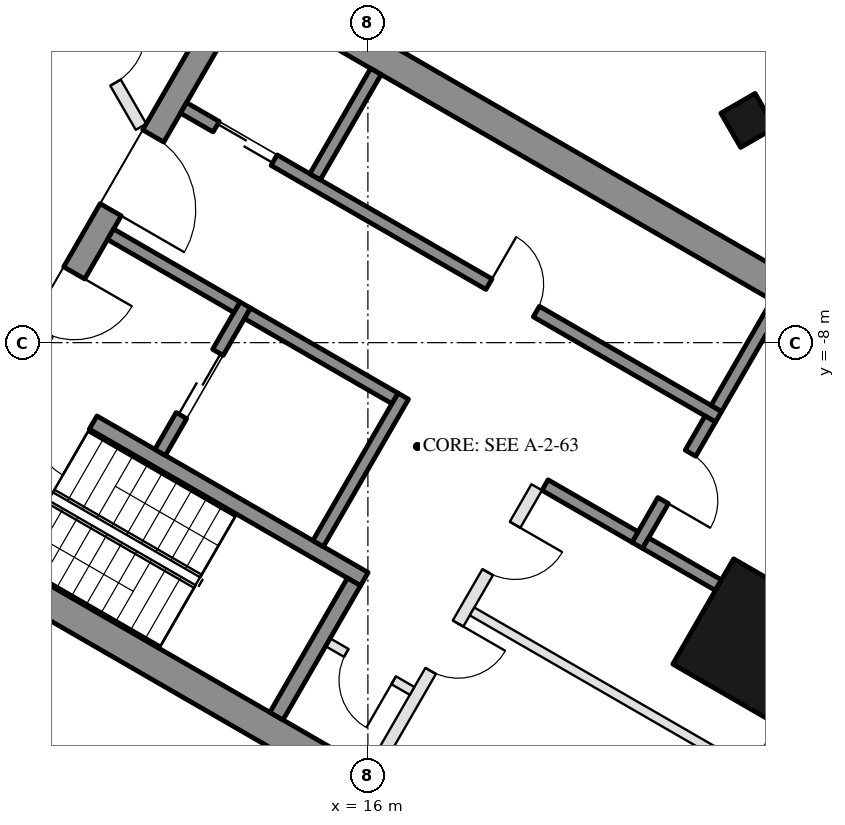
"""IFC4 building model, lengths in metres.
Left out: names, types, materials, properties, quantities, classifications, styles, units other than length and angle.
Written with IfcOpenShell. Run it as: python <this file> out.ifc"""

import sys

from ifc_helpers import new_model, si_unit, direction, frame, frame_2d, origin, origin_2d, place, context, subcontext, project, spatial, rectangle, hollow_rectangle, extrude, boolean, halfspace, element, fill, save


model = new_model("IFC4")
c1 = context("Model", 3, precision=1e-05, world=origin(), true_north=direction((0.0, 1.0)))
c2 = subcontext(c1, "Body", "Model", "MODEL_VIEW")
j1 = project(units=[si_unit("LENGTHUNIT", "METRE"), si_unit("PLANEANGLEUNIT", "RADIAN")], contexts=[c1])
p1 = place(None, origin())
s1 = spatial("IfcSite", under=j1, at=p1, CompositionType="ELEMENT")
p2 = place(p1, origin())
s2 = spatial("IfcBuilding", under=s1, at=p2, CompositionType="ELEMENT")
p3 = place(p2, frame((0.0, 0.0, 272.6)))
s3 = spatial("IfcBuildingStorey", under=s2, at=p3, CompositionType="ELEMENT", Elevation=272.6)
p4 = place(p3, frame((22.249, -4.345, 0.0), z_axis=(0.0, 0.0, 1.0), x_axis=(-0.5, 0.866025403784, 0.0)))
e1 = element("IfcColumn", 1, at=p4, inside=s3, PredefinedType="COLUMN", context=c2, shape_type="SweptSolid", body=[
    boolean("DIFFERENCE", extrude(hollow_rectangle(XDim=0.65, YDim=0.65, WallThickness=0.03, at=origin_2d()), origin(), (0.0, 0.0, 1.0), 3.7), halfspace(frame((0.0, 0.0, 3.653), z_axis=(0.0, 0.0, 1.0), x_axis=(1.0, 0.0, 0.0)), False)),
])
p5 = place(p3, frame((22.38, -12.921, 0.0), z_axis=(0.0, 0.0, 1.0), x_axis=(0.5, 0.866025403784, 0.0)))
e2 = element("IfcColumn", 2, at=p5, inside=s3, PredefinedType="COLUMN", context=c2, shape_type="SweptSolid", body=[
    boolean("DIFFERENCE", extrude(hollow_rectangle(XDim=2.0, YDim=2.0, WallThickness=0.05, at=origin_2d()), origin(), (0.0, 0.0, 1.0), 3.7), halfspace(frame((0.0, 0.0, 3.587), z_axis=(0.0, 0.0, 1.0), x_axis=(1.0, 0.0, 0.0)), False)),
])
p6 = place(p3, frame((22.065, -15.817, 0.0), z_axis=(0.0, 0.0, 1.0), x_axis=(0.500025039717, 0.866010946615, 0.0)))
e3 = element("IfcWall", 3, at=p6, inside=s3, PredefinedType="SOLIDWALL", context=c2, shape_type="SweptSolid", body=[
    extrude(rectangle(XDim=5.331, YDim=0.35, at=frame_2d((2.666, 0.0))), origin(), (0.0, 0.0, 1.0), 3.55),
])
p7 = place(p3, frame((24.731, -6.193, 0.0), z_axis=(0.0, 0.0, 1.0), x_axis=(-0.500007749075, 0.866020929808, 0.0)))
e4 = element("IfcWall", 4, at=p7, inside=s3, PredefinedType="SOLIDWALL", context=c2, shape_type="SweptSolid", body=[
    extrude(rectangle(XDim=11.185, YDim=0.35, at=frame_2d((5.593, 0.0))), origin(), (0.0, 0.0, 1.0), 3.55),
])
p8 = place(p7, frame((0.381, 0.0, 0.3)))
e5 = element("IfcOpeningElement", 5, at=p8, cuts=e4, PredefinedType="OPENING", context=c2, shape_type="SweptSolid", body=[
    extrude(rectangle(XDim=1.7, YDim=2.65, at=frame_2d((0.85, 1.325))), frame((0.0, 0.185, 0.0), z_axis=(0.0, -1.0, 0.0), x_axis=(1.0, 0.0, 0.0)), (0.0, 0.0, 1.0), 0.37),
])
p9 = place(p7, frame((7.21, 0.0, 0.0)))
e6 = element("IfcOpeningElement", 6, at=p9, cuts=e4, PredefinedType="OPENING", context=c2, shape_type="SweptSolid", body=[
    extrude(rectangle(XDim=2.4, YDim=2.4, at=frame_2d((1.2, 1.2))), frame((0.0, 0.185, 0.0), z_axis=(0.0, -1.0, 0.0), x_axis=(1.0, 0.0, 0.0)), (0.0, 0.0, 1.0), 0.37),
])
p10 = place(p7, frame((3.517, 0.0, 0.3)))
e7 = element("IfcOpeningElement", 7, at=p10, cuts=e4, PredefinedType="OPENING", context=c2, shape_type="SweptSolid", body=[
    extrude(rectangle(XDim=1.5, YDim=2.65, at=frame_2d((0.75, 1.325))), frame((0.0, 0.185, 0.0), z_axis=(0.0, -1.0, 0.0), x_axis=(1.0, 0.0, 0.0)), (0.0, 0.0, 1.0), 0.37),
])
p11 = place(p7, frame((5.317, 0.0, 0.3)))
e8 = element("IfcOpeningElement", 8, at=p11, cuts=e4, PredefinedType="OPENING", context=c2, shape_type="SweptSolid", body=[
    extrude(rectangle(XDim=1.5, YDim=2.65, at=frame_2d((0.75, 1.325))), frame((0.0, 0.185, 0.0), z_axis=(0.0, -1.0, 0.0), x_axis=(1.0, 0.0, 0.0)), (0.0, 0.0, 1.0), 0.37),
])
for number, where, z_axis, x_axis in (
    (9, (8.547, -10.997, 0.0), (0.0, 0.0, 1.0), (0.866, -0.5, 0.0)),
    (10, (13.797, -1.903, 0.0), (0.0, 0.0, 1.0), (0.866, -0.5, 0.0)),
):
    element("IfcWall", number, at=place(p3, frame(where, z_axis=z_axis, x_axis=x_axis)), inside=s3, PredefinedType="SHEAR", context=c2, shape_type="SweptSolid", body=[
        extrude(rectangle(XDim=13.031, YDim=0.5, at=frame_2d((6.516, 0.0))), origin(), (0.0, 0.0, 1.0), 3.5),
    ])
p12 = place(p3, frame((8.845, -10.88, 0.0), z_axis=(0.0, 0.0, 1.0), x_axis=(0.500004234368, 0.866022959057, 0.0)))
e11 = element("IfcWall", 11, at=p12, inside=s3, PredefinedType="SHEAR", context=c2, shape_type="SweptSolid", body=[
    extrude(rectangle(XDim=10.0, YDim=0.4, at=frame_2d((5.0, 0.0))), origin(), (0.0, 0.0, 1.0), 3.5),
])
p13 = place(p12, frame((3.55, 0.0, 0.0)))
e12 = element("IfcOpeningElement", 12, at=p13, cuts=e11, PredefinedType="OPENING", context=c2, shape_type="SweptSolid", body=[
    extrude(rectangle(XDim=1.1, YDim=2.1, at=frame_2d((0.55, 1.05))), frame((0.0, 0.21, 0.0), z_axis=(0.0, -1.0, 0.0), x_axis=(1.0, 0.0, 0.0)), (0.0, 0.0, 1.0), 0.42),
])
p14 = place(p12, frame((5.85, 0.0, 0.0)))
e13 = element("IfcOpeningElement", 13, at=p14, cuts=e11, PredefinedType="OPENING", context=c2, shape_type="SweptSolid", body=[
    extrude(rectangle(XDim=1.4, YDim=2.1, at=frame_2d((0.7, 1.05))), frame((0.0, 0.21, 0.0), z_axis=(0.0, -1.0, 0.0), x_axis=(1.0, 0.0, 0.0)), (0.0, 0.0, 1.0), 0.42),
])
p15 = place(p3, frame((10.356, -8.664, 0.0), z_axis=(0.0, 0.0, 1.0), x_axis=(0.866028629588, -0.499994412703, 0.0)))
e14 = element("IfcWall", 14, at=p15, inside=s3, PredefinedType="SHEAR", context=c2, shape_type="SweptSolid", body=[
    extrude(rectangle(XDim=6.45, YDim=0.25, at=frame_2d((3.225, 0.0))), origin(), (0.0, 0.0, 1.0), 3.5),
])
p16 = place(p15, frame((0.3, 0.0, 0.0)))
e15 = element("IfcOpeningElement", 15, at=p16, cuts=e14, PredefinedType="OPENING", context=c2, shape_type="SweptSolid", body=[
    extrude(rectangle(XDim=1.0, YDim=2.1, at=frame_2d((0.5, 1.05))), frame((0.0, 0.135, 0.0), z_axis=(0.0, -1.0, 0.0), x_axis=(1.0, 0.0, 0.0)), (0.0, 0.0, 1.0), 0.27),
])
p17 = place(p3, frame((14.496, -14.143, 0.0), z_axis=(0.0, 0.0, 1.0), x_axis=(0.500062241894, 0.865989465428, 0.0)))
e16 = element("IfcWall", 16, at=p17, inside=s3, PredefinedType="SHEAR", context=c2, shape_type="SweptSolid", body=[
    extrude(rectangle(XDim=2.55, YDim=0.25, at=frame_2d((1.275, 0.0))), origin(), (0.0, 0.0, 1.0), 3.5),
])
p18 = place(p3, frame((15.181, -11.305, 0.0), z_axis=(0.0, 0.0, 1.0), x_axis=(0.49994636267, 0.866056369097, 0.0)))
e17 = element("IfcWall", 17, at=p18, inside=s3, PredefinedType="SHEAR", context=c2, shape_type="SweptSolid", body=[
    extrude(rectangle(XDim=2.8, YDim=0.2, at=frame_2d((1.4, 0.0))), origin(), (0.0, 0.0, 1.0), 3.5),
])
p19 = place(p3, frame((12.583, -9.805, 0.0), z_axis=(0.0, 0.0, 1.0), x_axis=(0.49994636267, 0.866056369097, 0.0)))
e18 = element("IfcWall", 18, at=p19, inside=s3, PredefinedType="SHEAR", context=c2, shape_type="SweptSolid", body=[
    extrude(rectangle(XDim=2.8, YDim=0.2, at=frame_2d((1.4, 0.0))), origin(), (0.0, 0.0, 1.0), 3.5),
])
p20 = place(p19, frame((0.7, 0.0, 0.0)))
e19 = element("IfcOpeningElement", 19, at=p20, cuts=e18, PredefinedType="OPENING", context=c2, shape_type="SweptSolid", body=[
    extrude(rectangle(XDim=1.2, YDim=2.1, at=frame_2d((0.6, 1.05))), frame((0.0, 0.11, 0.0), z_axis=(0.0, -1.0, 0.0), x_axis=(1.0, 0.0, 0.0)), (0.0, 0.0, 1.0), 0.22),
])
p21 = place(p3, frame((11.768, -6.217, 0.0), z_axis=(0.0, 0.0, 1.0), x_axis=(0.866050077142, -0.499957262057, 0.0)))
e20 = element("IfcWall", 20, at=p21, inside=s3, PredefinedType="SHEAR", context=c2, shape_type="SweptSolid", body=[
    extrude(rectangle(XDim=2.4, YDim=0.2, at=frame_2d((1.2, 0.0))), origin(), (0.0, 0.0, 1.0), 3.5),
])
p22 = place(p3, frame((14.02, -7.517, 0.0), z_axis=(0.0, 0.0, 1.0), x_axis=(0.866034573852, -0.49998411664, 0.0)))
e21 = element("IfcWall", 21, at=p22, inside=s3, PredefinedType="SHEAR", context=c2, shape_type="SweptSolid", body=[
    extrude(rectangle(XDim=2.8, YDim=0.2, at=frame_2d((1.4, 0.0))), origin(), (0.0, 0.0, 1.0), 3.5),
])
p23 = place(p3, frame((12.968, -4.138, 0.0), z_axis=(0.0, 0.0, 1.0), x_axis=(0.866028328073, -0.49999493495, 0.0)))
e22 = element("IfcWall", 22, at=p23, inside=s3, PredefinedType="SHEAR", context=c2, shape_type="SweptSolid", body=[
    extrude(rectangle(XDim=10.16, YDim=0.2, at=frame_2d((5.08, 0.0))), origin(), (0.0, 0.0, 1.0), 3.5),
])
p24 = place(p23, frame((0.62, 0.0, 0.0)))
e23 = element("IfcOpeningElement", 23, at=p24, cuts=e22, PredefinedType="OPENING", context=c2, shape_type="SweptSolid", body=[
    extrude(rectangle(XDim=1.1, YDim=2.1, at=frame_2d((0.55, 1.05))), frame((0.0, 0.11, 0.0), z_axis=(0.0, -1.0, 0.0), x_axis=(1.0, 0.0, 0.0)), (0.0, 0.0, 1.0), 0.22),
])
p25 = place(p23, frame((5.8, 0.0, 0.0)))
e24 = element("IfcOpeningElement", 24, at=p25, cuts=e22, PredefinedType="OPENING", context=c2, shape_type="SweptSolid", body=[
    extrude(rectangle(XDim=0.9, YDim=2.1, at=frame_2d((0.45, 1.05))), frame((0.0, 0.11, 0.0), z_axis=(0.0, -1.0, 0.0), x_axis=(1.0, 0.0, 0.0)), (0.0, 0.0, 1.0), 0.22),
])
p26 = place(p3, frame((20.43, -11.333, 0.0), z_axis=(0.0, 0.0, 1.0), x_axis=(0.500001309137, 0.866024647952, 0.0)))
e25 = element("IfcWall", 25, at=p26, inside=s3, PredefinedType="SHEAR", context=c2, shape_type="SweptSolid", body=[
    extrude(rectangle(XDim=2.4, YDim=0.2, at=frame_2d((1.2, 0.0))), origin(), (0.0, 0.0, 1.0), 3.5),
])
p27 = place(p26, frame((0.85, 0.0, 0.0)))
e26 = element("IfcOpeningElement", 26, at=p27, cuts=e25, PredefinedType="OPENING", context=c2, shape_type="SweptSolid", body=[
    extrude(rectangle(XDim=0.9, YDim=2.1, at=frame_2d((0.45, 1.05))), frame((0.0, 0.11, 0.0), z_axis=(0.0, -1.0, 0.0), x_axis=(1.0, 0.0, 0.0)), (0.0, 0.0, 1.0), 0.22),
])
p28 = place(p3, frame((18.913, -10.342, 0.0), z_axis=(0.0, 0.0, 1.0), x_axis=(0.866038183914, -0.499977863513, 0.0)))
e27 = element("IfcWall", 27, at=p28, inside=s3, PredefinedType="SHEAR", context=c2, shape_type="SweptSolid", body=[
    extrude(rectangle(XDim=1.71, YDim=0.2, at=frame_2d((0.855, 0.0))), origin(), (0.0, 0.0, 1.0), 3.5),
])
for number, where, z_axis, x_axis in (
    (28, (15.131, -5.272, 0.0), (0.0, 0.0, 1.0), (0.5, 0.866, 0.0)),
    (29, (21.73, -9.082, 0.0), (0.0, 0.0, 1.0), (0.5, 0.866, 0.0)),
):
    element("IfcWall", number, at=place(p3, frame(where, z_axis=z_axis, x_axis=x_axis)), inside=s3, PredefinedType="SHEAR", context=c2, shape_type="SweptSolid", body=[
        extrude(rectangle(XDim=2.0, YDim=0.2, at=frame_2d((1.0, 0.0))), origin(), (0.0, 0.0, 1.0), 3.5),
    ])
p29 = place(p3, frame((20.567, -11.297, 0.0), z_axis=(0.0, 0.0, 1.0), x_axis=(0.866094443108, -0.499880401313, 0.0)))
e30 = element("IfcWall", 30, at=p29, inside=s3, PredefinedType="SHEAR", context=c2, shape_type="SweptSolid", body=[
    extrude(rectangle(XDim=1.383, YDim=0.2, at=frame_2d((0.691, 0.0))), origin(), (0.0, 0.0, 1.0), 3.5),
])
p30 = place(p3, frame((16.076, -15.055, 0.0), z_axis=(0.0, 0.0, 1.0), x_axis=(0.499995103361, 0.866028230842, 0.0)))
e31 = element("IfcWall", 31, at=p30, inside=s3, PredefinedType="PARTITIONING", context=c2, shape_type="SweptSolid", body=[
    extrude(rectangle(XDim=5.4, YDim=0.2, at=frame_2d((2.7, 0.0))), origin(), (0.0, 0.0, 1.0), 3.5),
])
p31 = place(p30, frame((1.913, 0.0, 0.0)))
e32 = element("IfcOpeningElement", 32, at=p31, cuts=e31, PredefinedType="OPENING", context=c2, shape_type="SweptSolid", body=[
    extrude(rectangle(XDim=0.9, YDim=2.1, at=frame_2d((0.45, 1.05))), frame((0.0, 0.11, 0.0), z_axis=(0.0, -1.0, 0.0), x_axis=(1.0, 0.0, 0.0)), (0.0, 0.0, 1.0), 0.22),
])
p32 = place(p30, frame((3.788, 0.0, 0.0)))
e33 = element("IfcOpeningElement", 33, at=p32, cuts=e31, PredefinedType="OPENING", context=c2, shape_type="SweptSolid", body=[
    extrude(rectangle(XDim=0.9, YDim=2.1, at=frame_2d((0.45, 1.05))), frame((0.0, 0.11, 0.0), z_axis=(0.0, -1.0, 0.0), x_axis=(1.0, 0.0, 0.0)), (0.0, 0.0, 1.0), 0.22),
])
p33 = place(p3, frame((15.342, -12.928, 0.0), z_axis=(0.0, 0.0, 1.0), x_axis=(0.865989903783, -0.500061482766, 0.0)))
e34 = element("IfcWall", 34, at=p33, inside=s3, PredefinedType="PARTITIONING", context=c2, shape_type="SweptSolid", body=[
    extrude(rectangle(XDim=1.6, YDim=0.15, at=frame_2d((0.8, 0.0))), origin(), (0.0, 0.0, 1.0), 3.5),
])
p34 = place(p33, frame((0.35, 0.0, 0.0)))
e35 = element("IfcOpeningElement", 35, at=p34, cuts=e34, PredefinedType="OPENING", context=c2, shape_type="SweptSolid", body=[
    extrude(rectangle(XDim=0.9, YDim=2.1, at=frame_2d((0.45, 1.05))), frame((0.0, 0.085, 0.0), z_axis=(0.0, -1.0, 0.0), x_axis=(1.0, 0.0, 0.0)), (0.0, 0.0, 1.0), 0.17),
])
p35 = place(p3, frame((17.713, -12.42, 0.0), z_axis=(0.0, 0.0, 1.0), x_axis=(0.866028878405, -0.499993981732, 0.0)))
e36 = element("IfcWall", 36, at=p35, inside=s3, PredefinedType="PARTITIONING", context=c2, shape_type="SweptSolid", body=[
    extrude(rectangle(XDim=5.292, YDim=0.15, at=frame_2d((2.646, 0.0))), origin(), (0.0, 0.0, 1.0), 3.5),
])
p36 = place(p3, frame((10.075, -0.65, 0.0), z_axis=(0.0, 0.0, 1.0), x_axis=(0.499998569178, -0.866026229868, 0.0)))
e37 = element("IfcWall", 37, at=p36, inside=s3, PredefinedType="PARTITIONING", context=c2, shape_type="SweptSolid", body=[
    extrude(rectangle(XDim=4.388, YDim=0.2, at=frame_2d((2.194, 0.0))), origin(), (0.0, 0.0, 1.0), 3.0),
])
p37 = place(p36, frame((2.55, 0.0, 0.0)))
e38 = element("IfcOpeningElement", 38, at=p37, cuts=e37, PredefinedType="OPENING", context=c2, shape_type="SweptSolid", body=[
    extrude(rectangle(XDim=1.0, YDim=2.1, at=frame_2d((0.5, 1.05))), frame((0.0, 0.11, 0.0), z_axis=(0.0, -1.0, 0.0), x_axis=(1.0, 0.0, 0.0)), (0.0, 0.0, 1.0), 0.22),
])
p38 = place(p20, origin())
e39 = element("IfcDoor", 39, at=p38, inside=s3, OperationType="DOUBLE_DOOR_SLIDING", PredefinedType="DOOR", context=c2, shape_type="SweptSolid", body=[
    extrude(rectangle(XDim=1.2, YDim=2.1, at=frame_2d((0.6, 1.05))), frame((0.0, 0.025, 0.0), z_axis=(0.0, -1.0, 0.0), x_axis=(1.0, 0.0, 0.0)), (0.0, 0.0, 1.0), 0.05),
])
fill(e19, e39)
p39 = place(p34, frame((0.9, 0.0, 0.0), z_axis=(0.0, 0.0, 1.0), x_axis=(-1.0, 0.0, 0.0)))
e40 = element("IfcDoor", 40, at=p39, inside=s3, OperationType="SINGLE_SWING_LEFT", PredefinedType="DOOR", context=c2, shape_type="SweptSolid", body=[
    extrude(rectangle(XDim=0.9, YDim=2.1, at=frame_2d((0.45, 1.05))), frame((0.0, 0.025, 0.0), z_axis=(0.0, -1.0, 0.0), x_axis=(1.0, 0.0, 0.0)), (0.0, 0.0, 1.0), 0.05),
])
fill(e35, e40)
p40 = place(p24, origin())
e41 = element("IfcDoor", 41, at=p40, inside=s3, OperationType="DOUBLE_DOOR_SLIDING", PredefinedType="DOOR", context=c2, shape_type="SweptSolid", body=[
    extrude(rectangle(XDim=1.1, YDim=2.1, at=frame_2d((0.55, 1.05))), frame((0.0, 0.025, 0.0), z_axis=(0.0, -1.0, 0.0), x_axis=(1.0, 0.0, 0.0)), (0.0, 0.0, 1.0), 0.05),
])
fill(e23, e41)
p41 = place(p25, origin())
e42 = element("IfcDoor", 42, at=p41, inside=s3, OperationType="SINGLE_SWING_LEFT", PredefinedType="DOOR", context=c2, shape_type="SweptSolid", body=[
    extrude(rectangle(XDim=0.9, YDim=2.1, at=frame_2d((0.45, 1.05))), frame((0.0, 0.025, 0.0), z_axis=(0.0, -1.0, 0.0), x_axis=(1.0, 0.0, 0.0)), (0.0, 0.0, 1.0), 0.05),
])
fill(e24, e42)
p42 = place(p27, frame((0.9, 0.0, 0.0), z_axis=(0.0, 0.0, 1.0), x_axis=(-1.0, 0.0, 0.0)))
e43 = element("IfcDoor", 43, at=p42, inside=s3, OperationType="SINGLE_SWING_RIGHT", PredefinedType="DOOR", context=c2, shape_type="SweptSolid", body=[
    extrude(rectangle(XDim=0.9, YDim=2.1, at=frame_2d((0.45, 1.05))), frame((0.0, 0.025, 0.0), z_axis=(0.0, -1.0, 0.0), x_axis=(1.0, 0.0, 0.0)), (0.0, 0.0, 1.0), 0.05),
])
fill(e26, e43)
p43 = place(p31, frame((0.9, 0.0, 0.0), z_axis=(0.0, 0.0, 1.0), x_axis=(-1.0, 0.0, 0.0)))
e44 = element("IfcDoor", 44, at=p43, inside=s3, OperationType="SINGLE_SWING_LEFT", PredefinedType="DOOR", context=c2, shape_type="SweptSolid", body=[
    extrude(rectangle(XDim=0.9, YDim=2.1, at=frame_2d((0.45, 1.05))), frame((0.0, 0.025, 0.0), z_axis=(0.0, -1.0, 0.0), x_axis=(1.0, 0.0, 0.0)), (0.0, 0.0, 1.0), 0.05),
])
fill(e32, e44)
p44 = place(p32, frame((0.9, 0.0, 0.0), z_axis=(0.0, 0.0, 1.0), x_axis=(-1.0, 0.0, 0.0)))
e45 = element("IfcDoor", 45, at=p44, inside=s3, OperationType="SINGLE_SWING_LEFT", PredefinedType="DOOR", context=c2, shape_type="SweptSolid", body=[
    extrude(rectangle(XDim=0.9, YDim=2.1, at=frame_2d((0.45, 1.05))), frame((0.0, 0.025, 0.0), z_axis=(0.0, -1.0, 0.0), x_axis=(1.0, 0.0, 0.0)), (0.0, 0.0, 1.0), 0.05),
])
fill(e33, e45)
p45 = place(p13, frame((1.1, 0.0, 0.0), z_axis=(0.0, 0.0, 1.0), x_axis=(-1.0, 0.0, 0.0)))
e46 = element("IfcDoor", 46, at=p45, inside=s3, OperationType="SINGLE_SWING_LEFT", PredefinedType="DOOR", context=c2, shape_type="SweptSolid", body=[
    extrude(rectangle(XDim=1.1, YDim=2.1, at=frame_2d((0.55, 1.05))), frame((0.0, 0.025, 0.0), z_axis=(0.0, -1.0, 0.0), x_axis=(1.0, 0.0, 0.0)), (0.0, 0.0, 1.0), 0.05),
])
fill(e12, e46)
p46 = place(p14, frame((1.4, 0.0, 0.0), z_axis=(0.0, 0.0, 1.0), x_axis=(-1.0, 0.0, 0.0)))
e47 = element("IfcDoor", 47, at=p46, inside=s3, OperationType="DOUBLE_DOOR_SINGLE_SWING", PredefinedType="DOOR", context=c2, shape_type="SweptSolid", body=[
    extrude(rectangle(XDim=1.4, YDim=2.1, at=frame_2d((0.7, 1.05))), frame((0.0, 0.025, 0.0), z_axis=(0.0, -1.0, 0.0), x_axis=(1.0, 0.0, 0.0)), (0.0, 0.0, 1.0), 0.05),
])
fill(e13, e47)
p47 = place(p16, frame((1.0, 0.0, 0.0), z_axis=(0.0, 0.0, 1.0), x_axis=(-1.0, 0.0, 0.0)))
e48 = element("IfcDoor", 48, at=p47, inside=s3, OperationType="SINGLE_SWING_LEFT", PredefinedType="DOOR", context=c2, shape_type="SweptSolid", body=[
    extrude(rectangle(XDim=1.0, YDim=2.1, at=frame_2d((0.5, 1.05))), frame((0.0, 0.025, 0.0), z_axis=(0.0, -1.0, 0.0), x_axis=(1.0, 0.0, 0.0)), (0.0, 0.0, 1.0), 0.05),
])
fill(e15, e48)
p48 = place(p37, origin())
e49 = element("IfcDoor", 49, at=p48, inside=s3, OperationType="SINGLE_SWING_LEFT", PredefinedType="DOOR", context=c2, shape_type="SweptSolid", body=[
    extrude(rectangle(XDim=1.0, YDim=2.1, at=frame_2d((0.5, 1.05))), frame((0.0, 0.025, 0.0), z_axis=(0.0, -1.0, 0.0), x_axis=(1.0, 0.0, 0.0)), (0.0, 0.0, 1.0), 0.05),
])
fill(e38, e49)
save(model, sys.argv[1])
